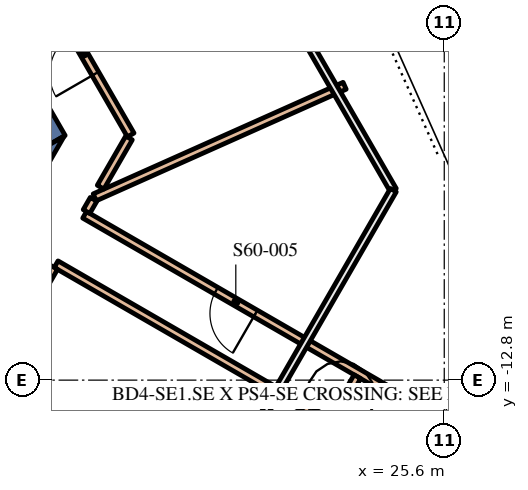
"""IFC4 building model, lengths in metres.
Left out: names, types, materials, properties, quantities, classifications, styles, units other than length and angle.
Written with IfcOpenShell. Run it as: python <this file> out.ifc"""

import sys

from ifc_helpers import new_model, si_unit, direction, frame, frame_2d, origin, place, context, subcontext, project, spatial, polyline, rectangle, outline, extrude, element, fill, save


model = new_model("IFC4")
c1 = context("Model", 3, precision=1e-05, world=origin(), true_north=direction((0.0, 1.0)))
c2 = subcontext(c1, "Body", "Model", "MODEL_VIEW")
j1 = project(units=[si_unit("LENGTHUNIT", "METRE"), si_unit("PLANEANGLEUNIT", "RADIAN")], contexts=[c1])
p1 = place(None, origin())
s1 = spatial("IfcSite", under=j1, at=p1, CompositionType="ELEMENT")
p2 = place(p1, origin())
s2 = spatial("IfcBuilding", under=s1, at=p2, CompositionType="ELEMENT")
p3 = place(p2, frame((0.0, 0.0, 256.2)))
s3 = spatial("IfcBuildingStorey", under=s2, at=p3, CompositionType="ELEMENT", Elevation=256.2)
p4 = place(p3, frame((9.085, 4.264, 0.0), z_axis=(0.0, 0.0, 1.0), x_axis=(0.499998082512, -0.866026510844, 0.0)))
e1 = element("IfcWall", 1, at=p4, inside=s3, PredefinedType="SOLIDWALL", context=c2, shape_type="SweptSolid", body=[
    extrude(rectangle(XDim=12.472, YDim=0.7, at=frame_2d((6.236, 0.0))), origin(), (0.0, 0.0, 1.0), 5.4),
])
p5 = place(p3, origin())
e2 = element("IfcWall", 2, at=p5, inside=s3, PredefinedType="SOLIDWALL", context=c2, shape_type="SweptSolid", body=[
    extrude(outline(polyline([(15.213, -7.05), (15.019, -6.714), (15.601, -6.378), (15.213, -7.05)])), origin(), (0.0, 0.0, 1.0), 5.4),
])
p6 = place(p3, frame((23.343, -14.343, 0.0), z_axis=(0.0, 0.0, 1.0), x_axis=(-0.866028486751, 0.499994660107, 0.0)))
e3 = element("IfcWall", 3, at=p6, inside=s3, PredefinedType="PARTITIONING", context=c2, shape_type="SweptSolid", body=[
    extrude(rectangle(XDim=9.187, YDim=0.2, at=frame_2d((4.594, 0.0))), origin(), (0.0, 0.0, 1.0), 4.3),
])
p7 = place(p3, frame((24.093, -13.044, 0.0), z_axis=(0.0, 0.0, 1.0), x_axis=(-0.866028486751, 0.499994660107, 0.0)))
e4 = element("IfcWall", 4, at=p7, inside=s3, PredefinedType="PARTITIONING", context=c2, shape_type="SweptSolid", body=[
    extrude(rectangle(XDim=9.187, YDim=0.2, at=frame_2d((4.594, 0.0))), origin(), (0.0, 0.0, 1.0), 4.3),
])
p8 = place(p7, frame((3.993, 0.0, 0.0)))
e5 = element("IfcOpeningElement", 5, at=p8, cuts=e4, PredefinedType="OPENING", context=c2, shape_type="SweptSolid", body=[
    extrude(rectangle(XDim=1.2, YDim=2.1, at=frame_2d((0.6, 1.05))), frame((0.0, 0.11, 0.0), z_axis=(0.0, -1.0, 0.0), x_axis=(1.0, 0.0, 0.0)), (0.0, 0.0, 1.0), 0.22),
])
p9 = place(p3, frame((16.402, -7.991, 0.0), z_axis=(0.0, 0.0, 1.0), x_axis=(0.913168751413, 0.407581686834, 0.0)))
e6 = element("IfcWall", 6, at=p9, inside=s3, PredefinedType="PARTITIONING", context=c2, shape_type="SweptSolid", body=[
    extrude(rectangle(XDim=7.202, YDim=0.2, at=frame_2d((3.601, 0.0))), origin(), (0.0, 0.0, 1.0), 4.3),
])
p10 = place(p3, frame((17.349, -6.35, 0.0), z_axis=(0.0, 0.0, 1.0), x_axis=(-0.499994255055, 0.866028720605, 0.0)))
e7 = element("IfcWall", 7, at=p10, inside=s3, PredefinedType="PARTITIONING", context=c2, shape_type="SweptSolid", body=[
    extrude(rectangle(XDim=4.924, YDim=0.2, at=frame_2d((2.462, 0.0))), origin(), (0.0, 0.0, 1.0), 4.3),
])
p11 = place(p10, frame((1.862, 0.0, 0.0)))
e8 = element("IfcOpeningElement", 8, at=p11, cuts=e7, PredefinedType="OPENING", context=c2, shape_type="SweptSolid", body=[
    extrude(rectangle(XDim=1.2, YDim=2.1, at=frame_2d((0.6, 1.05))), frame((0.0, 0.11, 0.0), z_axis=(0.0, -1.0, 0.0), x_axis=(1.0, 0.0, 0.0)), (0.0, 0.0, 1.0), 0.22),
])
p12 = place(p3, frame((15.337, -9.836, 0.0), z_axis=(0.0, 0.0, 1.0), x_axis=(-0.499968249168, -0.86604373436, 0.0)))
e9 = element("IfcWall", 9, at=p12, inside=s3, PredefinedType="PARTITIONING", context=c2, shape_type="SweptSolid", body=[
    extrude(rectangle(XDim=2.236, YDim=0.2, at=frame_2d((1.118, 0.0))), origin(), (0.0, 0.0, 1.0), 4.3),
])
p13 = place(p3, frame((17.304, -6.428, 0.0), z_axis=(0.0, 0.0, 1.0), x_axis=(-0.500108879088, -0.865962533287, 0.0)))
e10 = element("IfcWall", 10, at=p13, inside=s3, PredefinedType="PARTITIONING", context=c2, shape_type="SweptSolid", body=[
    extrude(rectangle(XDim=1.495, YDim=0.2, at=frame_2d((0.748, 0.0))), origin(), (0.0, 0.0, 1.0), 4.3),
])
p14 = place(p3, frame((23.313, -12.709, 0.0), z_axis=(0.0, 0.0, 1.0), x_axis=(-0.500014506688, -0.866017028182, 0.0)))
e11 = element("IfcWall", 11, at=p14, inside=s3, PredefinedType="PARTITIONING", context=c2, shape_type="SweptSolid", body=[
    extrude(rectangle(XDim=0.603, YDim=0.2, at=frame_2d((0.302, 0.0))), origin(), (0.0, 0.0, 1.0), 4.3),
])
p15 = place(p3, frame((16.372, -8.042, 0.0), z_axis=(0.0, 0.0, 1.0), x_axis=(-0.499817339582, -0.866130837145, 0.0)))
e12 = element("IfcWall", 12, at=p15, inside=s3, PredefinedType="PARTITIONING", context=c2, shape_type="SweptSolid", body=[
    extrude(rectangle(XDim=0.371, YDim=0.2, at=frame_2d((0.186, 0.0))), origin(), (0.0, 0.0, 1.0), 4.3),
])
p16 = place(p8, origin())
e13 = element("IfcDoor", 13, at=p16, inside=s3, OperationType="SINGLE_SWING_RIGHT", PredefinedType="DOOR", context=c2, shape_type="SweptSolid", body=[
    extrude(rectangle(XDim=1.2, YDim=2.1, at=frame_2d((0.6, 1.05))), frame((0.0, 0.025, 0.0), z_axis=(0.0, -1.0, 0.0), x_axis=(1.0, 0.0, 0.0)), (0.0, 0.0, 1.0), 0.05),
])
fill(e5, e13)
p17 = place(p11, origin())
e14 = element("IfcDoor", 14, at=p17, inside=s3, OperationType="SINGLE_SWING_RIGHT", PredefinedType="DOOR", context=c2, shape_type="SweptSolid", body=[
    extrude(rectangle(XDim=1.2, YDim=2.1, at=frame_2d((0.6, 1.05))), frame((0.0, 0.025, 0.0), z_axis=(0.0, -1.0, 0.0), x_axis=(1.0, 0.0, 0.0)), (0.0, 0.0, 1.0), 0.05),
])
fill(e8, e14)
save(model, sys.argv[1])
